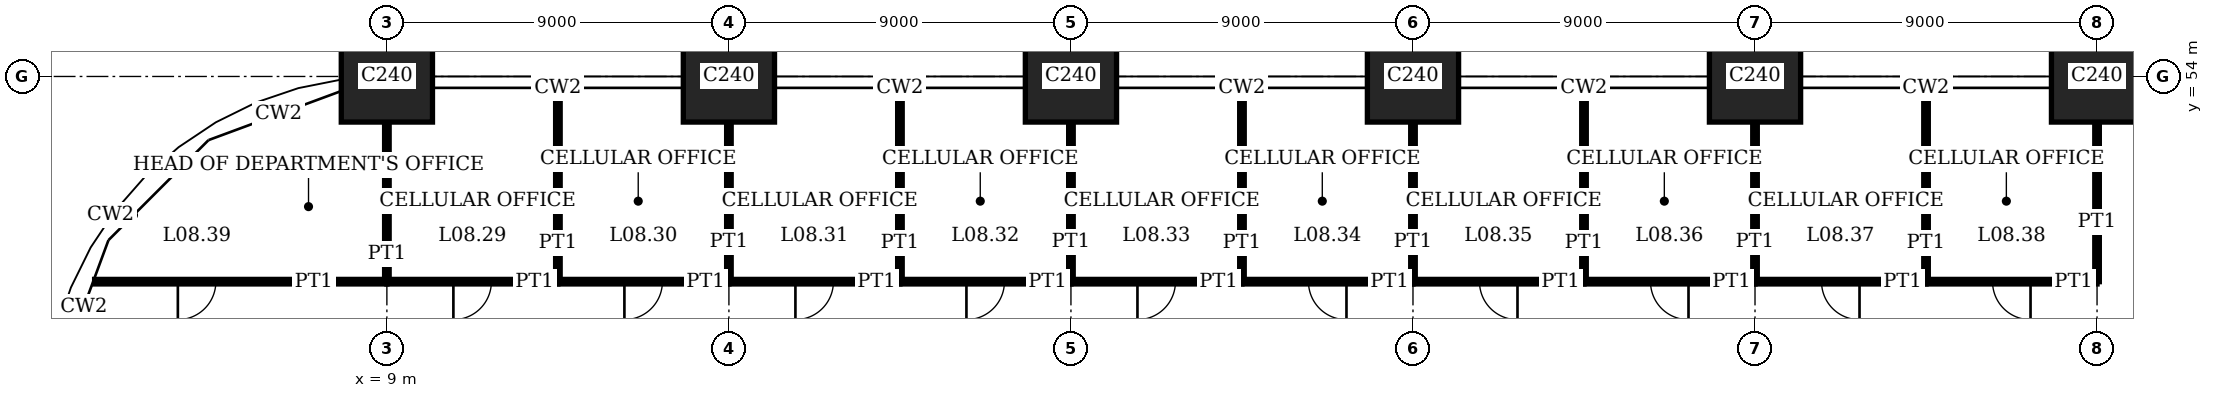
"""IFC4 building model, lengths in metres.
Left out: names, types, materials, properties, quantities, classifications, styles, units other than length and angle.
Written with IfcOpenShell. Run it as: python <this file> out.ifc"""

import sys

from ifc_helpers import new_model, si_unit, direction, frame, frame_2d, origin, origin_2d, place, context, subcontext, project, spatial, rectangle, extrude, element, fill, save


model = new_model("IFC4")
c1 = context("Model", 3, precision=1e-05, world=origin(), true_north=direction((0.0, 1.0)))
c2 = subcontext(c1, "Body", "Model", "MODEL_VIEW")
j1 = project(units=[si_unit("LENGTHUNIT", "METRE"), si_unit("PLANEANGLEUNIT", "RADIAN")], contexts=[c1])
p1 = place(None, origin())
s1 = spatial("IfcSite", under=j1, at=p1, CompositionType="ELEMENT")
p2 = place(p1, origin())
s2 = spatial("IfcBuilding", under=s1, at=p2, CompositionType="ELEMENT")
p3 = place(p2, frame((0.0, 0.0, 35.8)))
s3 = spatial("IfcBuildingStorey", under=s2, at=p3, CompositionType="ELEMENT", Elevation=35.8)
for number, where, z_axis, x_axis in (
    (1, (9.0, 54.0, 0.0), (0.0, 0.0, 1.0), (1.0, 0.0, 0.0)),
    (2, (18.0, 54.0, 0.0), (0.0, 0.0, 1.0), (1.0, 0.0, 0.0)),
    (3, (27.0, 54.0, 0.0), (0.0, 0.0, 1.0), (1.0, 0.0, 0.0)),
    (4, (36.0, 54.0, 0.0), (0.0, 0.0, 1.0), (1.0, 0.0, 0.0)),
    (5, (45.0, 54.0, 0.0), (0.0, 0.0, 1.0), (1.0, 0.0, 0.0)),
    (6, (54.0, 54.0, 0.0), (0.0, 0.0, 1.0), (1.0, 0.0, 0.0)),
):
    element("IfcColumn", number, at=place(p3, frame(where, z_axis=z_axis, x_axis=x_axis)), inside=s3, PredefinedType="COLUMN", context=c2, shape_type="SweptSolid", body=[
        extrude(rectangle(XDim=2.4, YDim=2.4, at=origin_2d()), origin(), (0.0, 0.0, 1.0), 4.0),
    ])
p4 = place(p3, frame((9.0, 48.6, 0.0), z_axis=(0.0, 0.0, 1.0), x_axis=(1.0, 0.0, 0.0)))
e7 = element("IfcWall", 7, at=p4, inside=s3, PredefinedType="PARTITIONING", context=c2, shape_type="SweptSolid", body=[
    extrude(rectangle(XDim=4.5, YDim=0.12, at=frame_2d((2.25, 0.0))), origin(), (0.0, 0.0, 1.0), 3.75),
])
p5 = place(p4, frame((1.75, 0.0, 0.0)))
e8 = element("IfcOpeningElement", 8, at=p5, cuts=e7, PredefinedType="OPENING", context=c2, shape_type="SweptSolid", body=[
    extrude(rectangle(XDim=1.0, YDim=2.4, at=frame_2d((0.5, 1.2))), frame((0.0, 0.07, 0.0), z_axis=(0.0, -1.0, 0.0), x_axis=(1.0, 0.0, 0.0)), (0.0, 0.0, 1.0), 0.14),
])
p6 = place(p3, frame((13.5, 48.6, 0.0), z_axis=(0.0, 0.0, 1.0), x_axis=(1.0, 0.0, 0.0)))
e9 = element("IfcWall", 9, at=p6, inside=s3, PredefinedType="PARTITIONING", context=c2, shape_type="SweptSolid", body=[
    extrude(rectangle(XDim=4.5, YDim=0.12, at=frame_2d((2.25, 0.0))), origin(), (0.0, 0.0, 1.0), 3.75),
])
p7 = place(p6, frame((1.75, 0.0, 0.0)))
e10 = element("IfcOpeningElement", 10, at=p7, cuts=e9, PredefinedType="OPENING", context=c2, shape_type="SweptSolid", body=[
    extrude(rectangle(XDim=1.0, YDim=2.4, at=frame_2d((0.5, 1.2))), frame((0.0, 0.07, 0.0), z_axis=(0.0, -1.0, 0.0), x_axis=(1.0, 0.0, 0.0)), (0.0, 0.0, 1.0), 0.14),
])
p8 = place(p3, frame((18.0, 48.6, 0.0), z_axis=(0.0, 0.0, 1.0), x_axis=(1.0, 0.0, 0.0)))
e11 = element("IfcWall", 11, at=p8, inside=s3, PredefinedType="PARTITIONING", context=c2, shape_type="SweptSolid", body=[
    extrude(rectangle(XDim=4.5, YDim=0.12, at=frame_2d((2.25, 0.0))), origin(), (0.0, 0.0, 1.0), 3.75),
])
p9 = place(p8, frame((1.75, 0.0, 0.0)))
e12 = element("IfcOpeningElement", 12, at=p9, cuts=e11, PredefinedType="OPENING", context=c2, shape_type="SweptSolid", body=[
    extrude(rectangle(XDim=1.0, YDim=2.4, at=frame_2d((0.5, 1.2))), frame((0.0, 0.07, 0.0), z_axis=(0.0, -1.0, 0.0), x_axis=(1.0, 0.0, 0.0)), (0.0, 0.0, 1.0), 0.14),
])
p10 = place(p3, frame((22.5, 48.6, 0.0), z_axis=(0.0, 0.0, 1.0), x_axis=(1.0, 0.0, 0.0)))
e13 = element("IfcWall", 13, at=p10, inside=s3, PredefinedType="PARTITIONING", context=c2, shape_type="SweptSolid", body=[
    extrude(rectangle(XDim=4.5, YDim=0.12, at=frame_2d((2.25, 0.0))), origin(), (0.0, 0.0, 1.0), 3.75),
])
p11 = place(p10, frame((1.75, 0.0, 0.0)))
e14 = element("IfcOpeningElement", 14, at=p11, cuts=e13, PredefinedType="OPENING", context=c2, shape_type="SweptSolid", body=[
    extrude(rectangle(XDim=1.0, YDim=2.4, at=frame_2d((0.5, 1.2))), frame((0.0, 0.07, 0.0), z_axis=(0.0, -1.0, 0.0), x_axis=(1.0, 0.0, 0.0)), (0.0, 0.0, 1.0), 0.14),
])
p12 = place(p3, frame((27.0, 48.6, 0.0), z_axis=(0.0, 0.0, 1.0), x_axis=(1.0, 0.0, 0.0)))
e15 = element("IfcWall", 15, at=p12, inside=s3, PredefinedType="PARTITIONING", context=c2, shape_type="SweptSolid", body=[
    extrude(rectangle(XDim=4.5, YDim=0.12, at=frame_2d((2.25, 0.0))), origin(), (0.0, 0.0, 1.0), 3.75),
])
p13 = place(p12, frame((1.75, 0.0, 0.0)))
e16 = element("IfcOpeningElement", 16, at=p13, cuts=e15, PredefinedType="OPENING", context=c2, shape_type="SweptSolid", body=[
    extrude(rectangle(XDim=1.0, YDim=2.4, at=frame_2d((0.5, 1.2))), frame((0.0, 0.07, 0.0), z_axis=(0.0, -1.0, 0.0), x_axis=(1.0, 0.0, 0.0)), (0.0, 0.0, 1.0), 0.14),
])
p14 = place(p3, frame((31.5, 48.6, 0.0), z_axis=(0.0, 0.0, 1.0), x_axis=(1.0, 0.0, 0.0)))
e17 = element("IfcWall", 17, at=p14, inside=s3, PredefinedType="PARTITIONING", context=c2, shape_type="SweptSolid", body=[
    extrude(rectangle(XDim=4.5, YDim=0.12, at=frame_2d((2.25, 0.0))), origin(), (0.0, 0.0, 1.0), 3.75),
])
p15 = place(p14, frame((1.75, 0.0, 0.0)))
e18 = element("IfcOpeningElement", 18, at=p15, cuts=e17, PredefinedType="OPENING", context=c2, shape_type="SweptSolid", body=[
    extrude(rectangle(XDim=1.0, YDim=2.4, at=frame_2d((0.5, 1.2))), frame((0.0, 0.07, 0.0), z_axis=(0.0, -1.0, 0.0), x_axis=(1.0, 0.0, 0.0)), (0.0, 0.0, 1.0), 0.14),
])
p16 = place(p3, frame((36.0, 48.6, 0.0), z_axis=(0.0, 0.0, 1.0), x_axis=(1.0, 0.0, 0.0)))
e19 = element("IfcWall", 19, at=p16, inside=s3, PredefinedType="PARTITIONING", context=c2, shape_type="SweptSolid", body=[
    extrude(rectangle(XDim=4.5, YDim=0.12, at=frame_2d((2.25, 0.0))), origin(), (0.0, 0.0, 1.0), 3.75),
])
p17 = place(p16, frame((1.75, 0.0, 0.0)))
e20 = element("IfcOpeningElement", 20, at=p17, cuts=e19, PredefinedType="OPENING", context=c2, shape_type="SweptSolid", body=[
    extrude(rectangle(XDim=1.0, YDim=2.4, at=frame_2d((0.5, 1.2))), frame((0.0, 0.07, 0.0), z_axis=(0.0, -1.0, 0.0), x_axis=(1.0, 0.0, 0.0)), (0.0, 0.0, 1.0), 0.14),
])
p18 = place(p3, frame((40.5, 48.6, 0.0), z_axis=(0.0, 0.0, 1.0), x_axis=(1.0, 0.0, 0.0)))
e21 = element("IfcWall", 21, at=p18, inside=s3, PredefinedType="PARTITIONING", context=c2, shape_type="SweptSolid", body=[
    extrude(rectangle(XDim=4.5, YDim=0.12, at=frame_2d((2.25, 0.0))), origin(), (0.0, 0.0, 1.0), 3.75),
])
p19 = place(p18, frame((1.75, 0.0, 0.0)))
e22 = element("IfcOpeningElement", 22, at=p19, cuts=e21, PredefinedType="OPENING", context=c2, shape_type="SweptSolid", body=[
    extrude(rectangle(XDim=1.0, YDim=2.4, at=frame_2d((0.5, 1.2))), frame((0.0, 0.07, 0.0), z_axis=(0.0, -1.0, 0.0), x_axis=(1.0, 0.0, 0.0)), (0.0, 0.0, 1.0), 0.14),
])
p20 = place(p3, frame((45.0, 48.6, 0.0), z_axis=(0.0, 0.0, 1.0), x_axis=(1.0, 0.0, 0.0)))
e23 = element("IfcWall", 23, at=p20, inside=s3, PredefinedType="PARTITIONING", context=c2, shape_type="SweptSolid", body=[
    extrude(rectangle(XDim=4.5, YDim=0.12, at=frame_2d((2.25, 0.0))), origin(), (0.0, 0.0, 1.0), 3.75),
])
p21 = place(p20, frame((1.75, 0.0, 0.0)))
e24 = element("IfcOpeningElement", 24, at=p21, cuts=e23, PredefinedType="OPENING", context=c2, shape_type="SweptSolid", body=[
    extrude(rectangle(XDim=1.0, YDim=2.4, at=frame_2d((0.5, 1.2))), frame((0.0, 0.07, 0.0), z_axis=(0.0, -1.0, 0.0), x_axis=(1.0, 0.0, 0.0)), (0.0, 0.0, 1.0), 0.14),
])
p22 = place(p3, frame((49.5, 48.6, 0.0), z_axis=(0.0, 0.0, 1.0), x_axis=(1.0, 0.0, 0.0)))
e25 = element("IfcWall", 25, at=p22, inside=s3, PredefinedType="PARTITIONING", context=c2, shape_type="SweptSolid", body=[
    extrude(rectangle(XDim=4.5, YDim=0.12, at=frame_2d((2.25, 0.0))), origin(), (0.0, 0.0, 1.0), 3.75),
])
p23 = place(p22, frame((1.75, 0.0, 0.0)))
e26 = element("IfcOpeningElement", 26, at=p23, cuts=e25, PredefinedType="OPENING", context=c2, shape_type="SweptSolid", body=[
    extrude(rectangle(XDim=1.0, YDim=2.4, at=frame_2d((0.5, 1.2))), frame((0.0, 0.07, 0.0), z_axis=(0.0, -1.0, 0.0), x_axis=(1.0, 0.0, 0.0)), (0.0, 0.0, 1.0), 0.14),
])
p24 = place(p3, frame((1.31, 48.6, 0.0), z_axis=(0.0, 0.0, 1.0), x_axis=(1.0, 0.0, 0.0)))
e27 = element("IfcWall", 27, at=p24, inside=s3, PredefinedType="PARTITIONING", context=c2, shape_type="SweptSolid", body=[
    extrude(rectangle(XDim=7.69, YDim=0.12, at=frame_2d((3.845, 0.0))), origin(), (0.0, 0.0, 1.0), 3.75),
])
p25 = place(p24, frame((2.19, 0.0, 0.0)))
e28 = element("IfcOpeningElement", 28, at=p25, cuts=e27, PredefinedType="OPENING", context=c2, shape_type="SweptSolid", body=[
    extrude(rectangle(XDim=1.0, YDim=2.4, at=frame_2d((0.5, 1.2))), frame((0.0, 0.07, 0.0), z_axis=(0.0, -1.0, 0.0), x_axis=(1.0, 0.0, 0.0)), (0.0, 0.0, 1.0), 0.14),
])
p26 = place(p3, frame((9.0, 48.6, 0.0), z_axis=(0.0, 0.0, 1.0), x_axis=(0.0, 1.0, 0.0)))
e29 = element("IfcWall", 29, at=p26, inside=s3, PredefinedType="PARTITIONING", context=c2, shape_type="SweptSolid", body=[
    extrude(rectangle(XDim=4.2, YDim=0.12, at=frame_2d((2.1, 0.0))), origin(), (0.0, 0.0, 1.0), 3.05),
])
p27 = place(p3, frame((13.5, 48.6, 0.0), z_axis=(0.0, 0.0, 1.0), x_axis=(0.0, 1.0, 0.0)))
e30 = element("IfcWall", 30, at=p27, inside=s3, PredefinedType="PARTITIONING", context=c2, shape_type="SweptSolid", body=[
    extrude(rectangle(XDim=5.09, YDim=0.12, at=frame_2d((2.545, 0.0))), origin(), (0.0, 0.0, 1.0), 3.75),
])
p28 = place(p3, frame((18.0, 48.6, 0.0), z_axis=(0.0, 0.0, 1.0), x_axis=(0.0, 1.0, 0.0)))
e31 = element("IfcWall", 31, at=p28, inside=s3, PredefinedType="PARTITIONING", context=c2, shape_type="SweptSolid", body=[
    extrude(rectangle(XDim=4.2, YDim=0.12, at=frame_2d((2.1, 0.0))), origin(), (0.0, 0.0, 1.0), 3.05),
])
p29 = place(p3, frame((22.5, 48.6, 0.0), z_axis=(0.0, 0.0, 1.0), x_axis=(0.0, 1.0, 0.0)))
e32 = element("IfcWall", 32, at=p29, inside=s3, PredefinedType="PARTITIONING", context=c2, shape_type="SweptSolid", body=[
    extrude(rectangle(XDim=5.09, YDim=0.12, at=frame_2d((2.545, 0.0))), origin(), (0.0, 0.0, 1.0), 3.75),
])
p30 = place(p3, frame((27.0, 48.6, 0.0), z_axis=(0.0, 0.0, 1.0), x_axis=(0.0, 1.0, 0.0)))
e33 = element("IfcWall", 33, at=p30, inside=s3, PredefinedType="PARTITIONING", context=c2, shape_type="SweptSolid", body=[
    extrude(rectangle(XDim=4.2, YDim=0.12, at=frame_2d((2.1, 0.0))), origin(), (0.0, 0.0, 1.0), 3.05),
])
p31 = place(p3, frame((31.5, 48.6, 0.0), z_axis=(0.0, 0.0, 1.0), x_axis=(0.0, 1.0, 0.0)))
e34 = element("IfcWall", 34, at=p31, inside=s3, PredefinedType="PARTITIONING", context=c2, shape_type="SweptSolid", body=[
    extrude(rectangle(XDim=5.09, YDim=0.12, at=frame_2d((2.545, 0.0))), origin(), (0.0, 0.0, 1.0), 3.75),
])
p32 = place(p3, frame((36.0, 48.6, 0.0), z_axis=(0.0, 0.0, 1.0), x_axis=(0.0, 1.0, 0.0)))
e35 = element("IfcWall", 35, at=p32, inside=s3, PredefinedType="PARTITIONING", context=c2, shape_type="SweptSolid", body=[
    extrude(rectangle(XDim=4.2, YDim=0.12, at=frame_2d((2.1, 0.0))), origin(), (0.0, 0.0, 1.0), 3.05),
])
p33 = place(p3, frame((40.5, 48.6, 0.0), z_axis=(0.0, 0.0, 1.0), x_axis=(0.0, 1.0, 0.0)))
e36 = element("IfcWall", 36, at=p33, inside=s3, PredefinedType="PARTITIONING", context=c2, shape_type="SweptSolid", body=[
    extrude(rectangle(XDim=5.09, YDim=0.12, at=frame_2d((2.545, 0.0))), origin(), (0.0, 0.0, 1.0), 3.75),
])
p34 = place(p3, frame((45.0, 48.6, 0.0), z_axis=(0.0, 0.0, 1.0), x_axis=(0.0, 1.0, 0.0)))
e37 = element("IfcWall", 37, at=p34, inside=s3, PredefinedType="PARTITIONING", context=c2, shape_type="SweptSolid", body=[
    extrude(rectangle(XDim=4.2, YDim=0.12, at=frame_2d((2.1, 0.0))), origin(), (0.0, 0.0, 1.0), 3.05),
])
p35 = place(p3, frame((49.5, 48.6, 0.0), z_axis=(0.0, 0.0, 1.0), x_axis=(0.0, 1.0, 0.0)))
e38 = element("IfcWall", 38, at=p35, inside=s3, PredefinedType="PARTITIONING", context=c2, shape_type="SweptSolid", body=[
    extrude(rectangle(XDim=5.09, YDim=0.12, at=frame_2d((2.545, 0.0))), origin(), (0.0, 0.0, 1.0), 3.75),
])
p36 = place(p3, frame((54.0, 48.6, 0.0), z_axis=(0.0, 0.0, 1.0), x_axis=(0.0, 1.0, 0.0)))
e39 = element("IfcWall", 39, at=p36, inside=s3, PredefinedType="PARTITIONING", context=c2, shape_type="SweptSolid", body=[
    extrude(rectangle(XDim=4.2, YDim=0.12, at=frame_2d((2.1, 0.0))), origin(), (0.0, 0.0, 1.0), 3.05),
])
p37 = place(p5, origin())
e40 = element("IfcDoor", 40, at=p37, inside=s3, OperationType="SINGLE_SWING_LEFT", PredefinedType="DOOR", context=c2, shape_type="SweptSolid", body=[
    extrude(rectangle(XDim=1.0, YDim=2.4, at=frame_2d((0.5, 1.2))), frame((0.0, 0.025, 0.0), z_axis=(0.0, -1.0, 0.0), x_axis=(1.0, 0.0, 0.0)), (0.0, 0.0, 1.0), 0.05),
])
fill(e8, e40)
p38 = place(p7, origin())
e41 = element("IfcDoor", 41, at=p38, inside=s3, OperationType="SINGLE_SWING_LEFT", PredefinedType="DOOR", context=c2, shape_type="SweptSolid", body=[
    extrude(rectangle(XDim=1.0, YDim=2.4, at=frame_2d((0.5, 1.2))), frame((0.0, 0.025, 0.0), z_axis=(0.0, -1.0, 0.0), x_axis=(1.0, 0.0, 0.0)), (0.0, 0.0, 1.0), 0.05),
])
fill(e10, e41)
p39 = place(p9, origin())
e42 = element("IfcDoor", 42, at=p39, inside=s3, OperationType="SINGLE_SWING_LEFT", PredefinedType="DOOR", context=c2, shape_type="SweptSolid", body=[
    extrude(rectangle(XDim=1.0, YDim=2.4, at=frame_2d((0.5, 1.2))), frame((0.0, 0.025, 0.0), z_axis=(0.0, -1.0, 0.0), x_axis=(1.0, 0.0, 0.0)), (0.0, 0.0, 1.0), 0.05),
])
fill(e12, e42)
p40 = place(p11, origin())
e43 = element("IfcDoor", 43, at=p40, inside=s3, OperationType="SINGLE_SWING_LEFT", PredefinedType="DOOR", context=c2, shape_type="SweptSolid", body=[
    extrude(rectangle(XDim=1.0, YDim=2.4, at=frame_2d((0.5, 1.2))), frame((0.0, 0.025, 0.0), z_axis=(0.0, -1.0, 0.0), x_axis=(1.0, 0.0, 0.0)), (0.0, 0.0, 1.0), 0.05),
])
fill(e14, e43)
p41 = place(p13, origin())
e44 = element("IfcDoor", 44, at=p41, inside=s3, OperationType="SINGLE_SWING_LEFT", PredefinedType="DOOR", context=c2, shape_type="SweptSolid", body=[
    extrude(rectangle(XDim=1.0, YDim=2.4, at=frame_2d((0.5, 1.2))), frame((0.0, 0.025, 0.0), z_axis=(0.0, -1.0, 0.0), x_axis=(1.0, 0.0, 0.0)), (0.0, 0.0, 1.0), 0.05),
])
fill(e16, e44)
p42 = place(p15, origin())
e45 = element("IfcDoor", 45, at=p42, inside=s3, OperationType="SINGLE_SWING_RIGHT", PredefinedType="DOOR", context=c2, shape_type="SweptSolid", body=[
    extrude(rectangle(XDim=1.0, YDim=2.4, at=frame_2d((0.5, 1.2))), frame((0.0, 0.025, 0.0), z_axis=(0.0, -1.0, 0.0), x_axis=(1.0, 0.0, 0.0)), (0.0, 0.0, 1.0), 0.05),
])
fill(e18, e45)
p43 = place(p17, origin())
e46 = element("IfcDoor", 46, at=p43, inside=s3, OperationType="SINGLE_SWING_RIGHT", PredefinedType="DOOR", context=c2, shape_type="SweptSolid", body=[
    extrude(rectangle(XDim=1.0, YDim=2.4, at=frame_2d((0.5, 1.2))), frame((0.0, 0.025, 0.0), z_axis=(0.0, -1.0, 0.0), x_axis=(1.0, 0.0, 0.0)), (0.0, 0.0, 1.0), 0.05),
])
fill(e20, e46)
p44 = place(p19, origin())
e47 = element("IfcDoor", 47, at=p44, inside=s3, OperationType="SINGLE_SWING_RIGHT", PredefinedType="DOOR", context=c2, shape_type="SweptSolid", body=[
    extrude(rectangle(XDim=1.0, YDim=2.4, at=frame_2d((0.5, 1.2))), frame((0.0, 0.025, 0.0), z_axis=(0.0, -1.0, 0.0), x_axis=(1.0, 0.0, 0.0)), (0.0, 0.0, 1.0), 0.05),
])
fill(e22, e47)
p45 = place(p21, origin())
e48 = element("IfcDoor", 48, at=p45, inside=s3, OperationType="SINGLE_SWING_RIGHT", PredefinedType="DOOR", context=c2, shape_type="SweptSolid", body=[
    extrude(rectangle(XDim=1.0, YDim=2.4, at=frame_2d((0.5, 1.2))), frame((0.0, 0.025, 0.0), z_axis=(0.0, -1.0, 0.0), x_axis=(1.0, 0.0, 0.0)), (0.0, 0.0, 1.0), 0.05),
])
fill(e24, e48)
p46 = place(p23, origin())
e49 = element("IfcDoor", 49, at=p46, inside=s3, OperationType="SINGLE_SWING_RIGHT", PredefinedType="DOOR", context=c2, shape_type="SweptSolid", body=[
    extrude(rectangle(XDim=1.0, YDim=2.4, at=frame_2d((0.5, 1.2))), frame((0.0, 0.025, 0.0), z_axis=(0.0, -1.0, 0.0), x_axis=(1.0, 0.0, 0.0)), (0.0, 0.0, 1.0), 0.05),
])
fill(e26, e49)
p47 = place(p25, origin())
e50 = element("IfcDoor", 50, at=p47, inside=s3, OperationType="SINGLE_SWING_LEFT", PredefinedType="DOOR", context=c2, shape_type="SweptSolid", body=[
    extrude(rectangle(XDim=1.0, YDim=2.4, at=frame_2d((0.5, 1.2))), frame((0.0, 0.025, 0.0), z_axis=(0.0, -1.0, 0.0), x_axis=(1.0, 0.0, 0.0)), (0.0, 0.0, 1.0), 0.05),
])
fill(e28, e50)
save(model, sys.argv[1])
